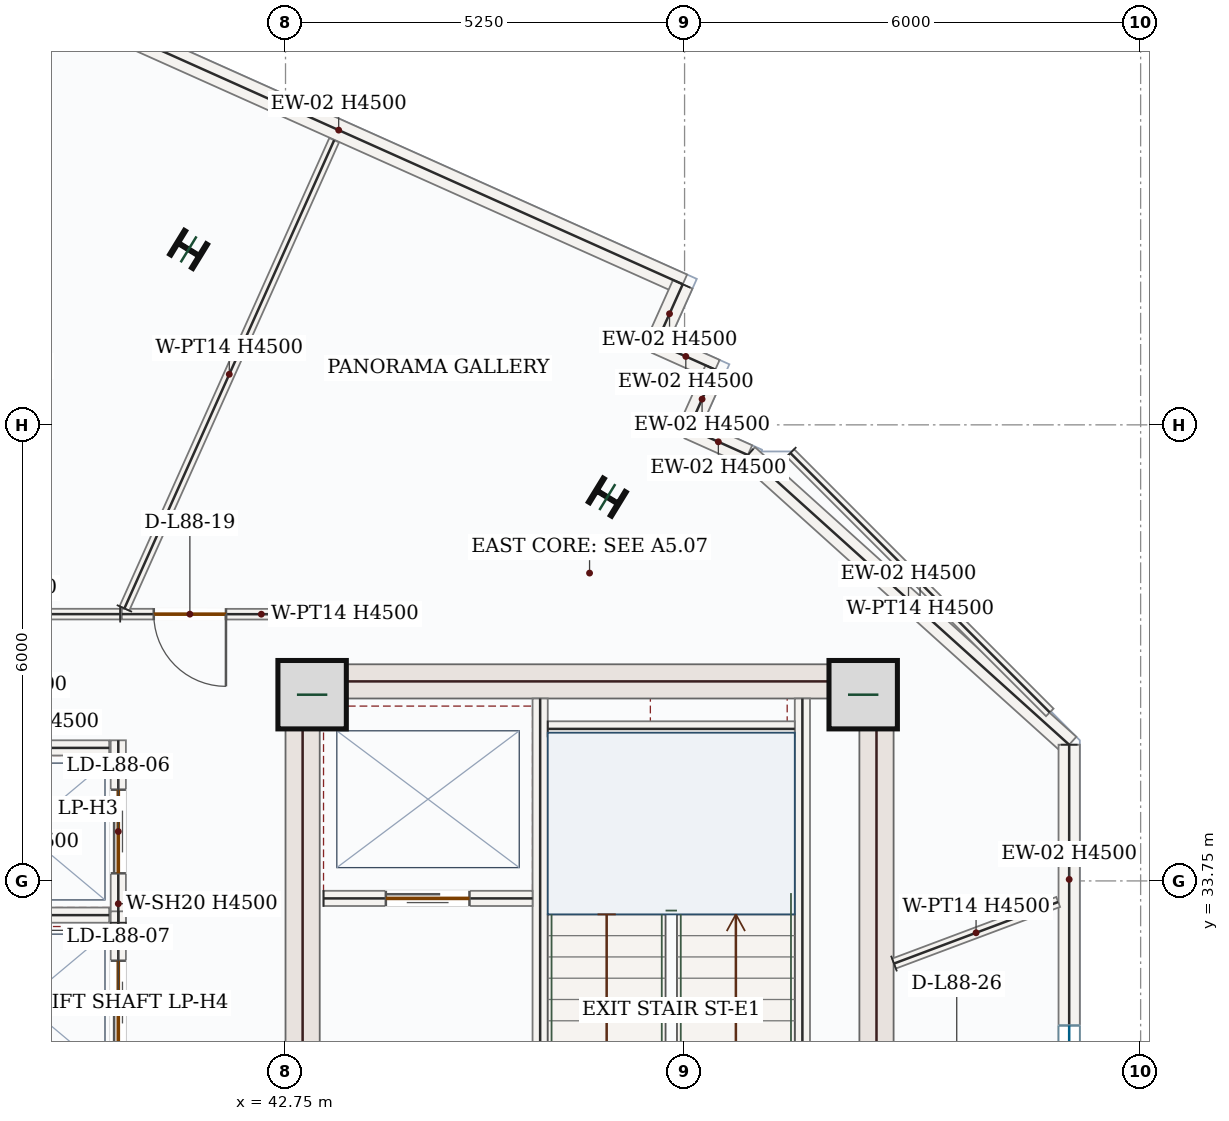
"""IFC4 building model, lengths in metres.
Left out: names, types, materials, properties, quantities, classifications, styles, units other than length and angle.
Written with IfcOpenShell. Run it as: python <this file> out.ifc"""

import sys

from ifc_helpers import new_model, si_unit, direction, frame, frame_2d, origin, origin_2d, place, context, subcontext, project, spatial, rectangle, i_section, extrude, source, transform, mapped, element, fill, save


model = new_model("IFC4")
c1 = context("Model", 3, precision=1e-05, world=origin(), true_north=direction((0.0, 1.0)))
c2 = subcontext(c1, "Body", "Model", "MODEL_VIEW")
j1 = project(units=[si_unit("LENGTHUNIT", "METRE"), si_unit("PLANEANGLEUNIT", "RADIAN")], contexts=[c1])
p1 = place(None, origin())
s1 = spatial("IfcSite", under=j1, at=p1, CompositionType="ELEMENT")
p2 = place(p1, origin())
s2 = spatial("IfcBuilding", under=s1, at=p2, CompositionType="ELEMENT")
p3 = place(p2, frame((0.0, 0.0, 361.05)))
s3 = spatial("IfcBuildingStorey", under=s2, at=p3, CompositionType="ELEMENT", Elevation=361.05)
p4 = place(p3, frame((42.975, 28.05, 0.0), z_axis=(0.0, 0.0, 1.0), x_axis=(0.0, 1.0, 0.0)))
e1 = element("IfcWall", 1, at=p4, inside=s3, PredefinedType="SHEAR", context=c2, shape_type="SweptSolid", body=[
    extrude(rectangle(XDim=8.55, YDim=0.45, at=frame_2d((4.275, 0.0))), origin(), (0.0, 0.0, 1.0), 4.5),
])
p5 = place(p4, frame((1.5, 0.0, 0.0)))
e2 = element("IfcOpeningElement", 2, at=p5, cuts=e1, PredefinedType="OPENING", context=c2, shape_type="SweptSolid", body=[
    extrude(rectangle(XDim=1.1, YDim=2.2, at=frame_2d((0.55, 1.1))), frame((0.0, 0.235, 0.0), z_axis=(0.0, -1.0, 0.0), x_axis=(1.0, 0.0, 0.0)), (0.0, 0.0, 1.0), 0.47),
])
m1 = source(origin(), c2, "Body", "SweptSolid", [
    extrude(rectangle(XDim=8.55, YDim=0.45, at=frame_2d((4.275, 0.0))), origin(), (0.0, 0.0, 1.0), 4.5),
])
p6 = place(p3, frame((50.525, 28.05, 0.0), z_axis=(0.0, 0.0, 1.0), x_axis=(0.0, 1.0, 0.0)))
e3 = element("IfcWall", 3, at=p6, inside=s3, PredefinedType="SHEAR", context=c2, shape_type="MappedRepresentation", body=[
    mapped(m1, transform((0.0, 0.0, 0.0), x_axis=(1.0, 0.0, 0.0), y_axis=(0.0, 1.0, 0.0), z_axis=(0.0, 0.0, 1.0), scale=1.0)),
])
m2 = source(origin(), c2, "Body", "SweptSolid", [
    extrude(rectangle(XDim=7.1, YDim=0.45, at=frame_2d((3.55, 0.0))), origin(), (0.0, 0.0, 1.0), 4.5),
])
p7 = place(p3, frame((43.2, 36.375, 0.0), z_axis=(0.0, 0.0, 1.0), x_axis=(1.0, 0.0, 0.0)))
e4 = element("IfcWall", 4, at=p7, inside=s3, PredefinedType="SHEAR", context=c2, shape_type="MappedRepresentation", body=[
    mapped(m2, transform((0.0, 0.0, 0.0), x_axis=(1.0, 0.0, 0.0), y_axis=(0.0, 1.0, 0.0), z_axis=(0.0, 0.0, 1.0), scale=1.0)),
])
m3 = source(origin(), c2, "Body", "SweptSolid", [
    extrude(rectangle(XDim=0.9, YDim=0.9, at=origin_2d()), origin(), (0.0, 0.0, 1.0), 4.8),
])
for number, where, z_axis, x_axis in (
    (5, (43.1, 36.2, 0.0), (0.0, 0.0, 1.0), (1.0, 0.0, 0.0)),
    (6, (50.35, 36.2, 0.0), (0.0, 0.0, 1.0), (1.0, 0.0, 0.0)),
):
    element("IfcColumn", number, at=place(p3, frame(where, z_axis=z_axis, x_axis=x_axis)), inside=s3, PredefinedType="COLUMN", context=c2, shape_type="MappedRepresentation", body=[
        mapped(m3, transform((0.0, 0.0, 0.0), x_axis=(1.0, 0.0, 0.0), y_axis=(0.0, 1.0, 0.0), z_axis=(0.0, 0.0, 1.0), scale=1.0)),
    ])
m4 = source(origin(), c2, "Body", "SweptSolid", [
    extrude(i_section(OverallWidth=0.369, OverallDepth=0.356, WebThickness=0.011, FlangeThickness=0.018, FilletRadius=0.018, at=origin_2d()), origin(), (0.0, 0.0, 1.0), 4.8),
])
for number, where, z_axis, x_axis in (
    (7, (46.984, 38.8, 0.0), (0.0, 0.0, 1.0), (0.522, 0.853, 0.0)),
    (8, (41.475, 42.058, 0.0), (0.0, 0.0, 1.0), (0.522, 0.853, 0.0)),
):
    element("IfcColumn", number, at=place(p3, frame(where, z_axis=z_axis, x_axis=x_axis)), inside=s3, PredefinedType="COLUMN", context=c2, shape_type="MappedRepresentation", body=[
        mapped(m4, transform((0.0, 0.0, 0.0), x_axis=(1.0, 0.0, 0.0), y_axis=(0.0, 1.0, 0.0), z_axis=(0.0, 0.0, 1.0), scale=1.0)),
    ])
m5 = source(origin(), c2, "Body", "SweptSolid", [
    extrude(rectangle(XDim=9.92, YDim=0.28, at=frame_2d((4.96, 0.0))), origin(), (0.0, 0.0, 1.0), 4.5),
])
p8 = place(p3, frame((38.923, 45.656, 0.0), z_axis=(0.0, 0.0, 1.0), x_axis=(0.91259673328, -0.408860859469, 0.0)))
e9 = element("IfcWall", 9, at=p8, inside=s3, PredefinedType="SOLIDWALL", context=c2, shape_type="MappedRepresentation", body=[
    mapped(m5, transform((0.0, 0.0, 0.0), x_axis=(1.0, 0.0, 0.0), y_axis=(0.0, 1.0, 0.0), z_axis=(0.0, 0.0, 1.0), scale=1.0)),
])
m6 = source(origin(), c2, "Body", "SweptSolid", [
    extrude(rectangle(XDim=0.85, YDim=0.28, at=frame_2d((0.425, 0.0))), origin(), (0.0, 0.0, 1.0), 4.5),
])
p9 = place(p3, frame((47.976, 41.6, 0.0), z_axis=(0.0, 0.0, 1.0), x_axis=(-0.408775447691, -0.912634994598, 0.0)))
e10 = element("IfcWall", 10, at=p9, inside=s3, PredefinedType="SOLIDWALL", context=c2, shape_type="MappedRepresentation", body=[
    mapped(m6, transform((0.0, 0.0, 0.0), x_axis=(1.0, 0.0, 0.0), y_axis=(0.0, 1.0, 0.0), z_axis=(0.0, 0.0, 1.0), scale=1.0)),
])
m7 = source(origin(), c2, "Body", "SweptSolid", [
    extrude(rectangle(XDim=0.85, YDim=0.28, at=frame_2d((0.425, 0.0))), origin(), (0.0, 0.0, 1.0), 4.5),
])
p10 = place(p3, frame((47.628, 40.824, 0.0), z_axis=(0.0, 0.0, 1.0), x_axis=(0.912527808644, -0.409014667771, 0.0)))
e11 = element("IfcWall", 11, at=p10, inside=s3, PredefinedType="SOLIDWALL", context=c2, shape_type="MappedRepresentation", body=[
    mapped(m7, transform((0.0, 0.0, 0.0), x_axis=(1.0, 0.0, 0.0), y_axis=(0.0, 1.0, 0.0), z_axis=(0.0, 0.0, 1.0), scale=1.0)),
])
p11 = place(p3, frame((48.404, 40.476, 0.0), z_axis=(0.0, 0.0, 1.0), x_axis=(-0.408775447691, -0.912634994598, 0.0)))
e12 = element("IfcWall", 12, at=p11, inside=s3, PredefinedType="SOLIDWALL", context=c2, shape_type="MappedRepresentation", body=[
    mapped(m6, transform((0.0, 0.0, 0.0), x_axis=(1.0, 0.0, 0.0), y_axis=(0.0, 1.0, 0.0), z_axis=(0.0, 0.0, 1.0), scale=1.0)),
])
p12 = place(p3, frame((48.057, 39.701, 0.0), z_axis=(0.0, 0.0, 1.0), x_axis=(0.912527808644, -0.409014667771, 0.0)))
e13 = element("IfcWall", 13, at=p12, inside=s3, PredefinedType="SOLIDWALL", context=c2, shape_type="MappedRepresentation", body=[
    mapped(m7, transform((0.0, 0.0, 0.0), x_axis=(1.0, 0.0, 0.0), y_axis=(0.0, 1.0, 0.0), z_axis=(0.0, 0.0, 1.0), scale=1.0)),
])
m8 = source(origin(), c2, "Body", "SweptSolid", [
    extrude(rectangle(XDim=5.692, YDim=0.28, at=frame_2d((2.846, 0.0))), origin(), (0.0, 0.0, 1.0), 4.5),
])
p13 = place(p3, frame((48.832, 39.353, 0.0), z_axis=(0.0, 0.0, 1.0), x_axis=(0.742767121681, -0.669549850981, 0.0)))
e14 = element("IfcWall", 14, at=p13, inside=s3, PredefinedType="SOLIDWALL", context=c2, shape_type="MappedRepresentation", body=[
    mapped(m8, transform((0.0, 0.0, 0.0), x_axis=(1.0, 0.0, 0.0), y_axis=(0.0, 1.0, 0.0), z_axis=(0.0, 0.0, 1.0), scale=1.0)),
])
p14 = place(p3, frame((53.06, 35.542, 0.0), z_axis=(0.0, 0.0, 1.0), x_axis=(0.0, -1.0, 0.0)))
e15 = element("IfcWall", 15, at=p14, inside=s3, PredefinedType="SOLIDWALL", context=c2, shape_type="SweptSolid", body=[
    extrude(rectangle(XDim=8.887, YDim=0.28, at=frame_2d((4.444, 0.0))), origin(), (0.0, 0.0, 1.0), 4.5),
])
p15 = place(p14, frame((3.694, 0.0, 0.85)))
e16 = element("IfcOpeningElement", 16, at=p15, cuts=e15, PredefinedType="OPENING", context=c2, shape_type="SweptSolid", body=[
    extrude(rectangle(XDim=1.5, YDim=1.5, at=frame_2d((0.75, 0.75))), frame((0.0, 0.15, 0.0), z_axis=(0.0, -1.0, 0.0), x_axis=(1.0, 0.0, 0.0)), (0.0, 0.0, 1.0), 0.3),
])
m9 = source(origin(), c2, "Body", "SweptSolid", [
    extrude(rectangle(XDim=7.87, YDim=0.2, at=frame_2d((3.935, 0.0))), origin(), (0.0, 0.0, 1.0), 4.5),
])
p16 = place(p3, frame((49.55, 28.28, 0.0), z_axis=(0.0, 0.0, 1.0), x_axis=(0.0, 1.0, 0.0)))
e17 = element("IfcWall", 17, at=p16, inside=s3, PredefinedType="SOLIDWALL", context=c2, shape_type="MappedRepresentation", body=[
    mapped(m9, transform((0.0, 0.0, 0.0), x_axis=(1.0, 0.0, 0.0), y_axis=(0.0, 1.0, 0.0), z_axis=(0.0, 0.0, 1.0), scale=1.0)),
])
p17 = place(p3, frame((46.1, 28.15, 0.0), z_axis=(0.0, 0.0, 1.0), x_axis=(0.0, 1.0, 0.0)))
e18 = element("IfcWall", 18, at=p17, inside=s3, PredefinedType="SOLIDWALL", context=c2, shape_type="SweptSolid", body=[
    extrude(rectangle(XDim=8.0, YDim=0.2, at=frame_2d((4.0, 0.0))), origin(), (0.0, 0.0, 1.0), 4.5),
])
p18 = place(p17, frame((0.4, 0.0, 0.0)))
e19 = element("IfcOpeningElement", 19, at=p18, cuts=e18, PredefinedType="OPENING", context=c2, shape_type="SweptSolid", body=[
    extrude(rectangle(XDim=1.05, YDim=2.15, at=frame_2d((0.525, 1.075))), frame((0.0, 0.11, 0.0), z_axis=(0.0, -1.0, 0.0), x_axis=(1.0, 0.0, 0.0)), (0.0, 0.0, 1.0), 0.22),
])
m10 = source(origin(), c2, "Body", "SweptSolid", [
    extrude(rectangle(XDim=3.25, YDim=0.2, at=frame_2d((1.625, 0.0))), origin(), (0.0, 0.0, 1.0), 4.5),
])
p19 = place(p3, frame((46.2, 35.75, 0.0), z_axis=(0.0, 0.0, 1.0), x_axis=(1.0, 0.0, 0.0)))
e20 = element("IfcWall", 20, at=p19, inside=s3, PredefinedType="SOLIDWALL", context=c2, shape_type="MappedRepresentation", body=[
    mapped(m10, transform((0.0, 0.0, 0.0), x_axis=(1.0, 0.0, 0.0), y_axis=(0.0, 1.0, 0.0), z_axis=(0.0, 0.0, 1.0), scale=1.0)),
])
p20 = place(p3, frame((43.25, 33.52, 0.0), z_axis=(0.0, 0.0, 1.0), x_axis=(1.0, 0.0, 0.0)))
e21 = element("IfcWall", 21, at=p20, inside=s3, PredefinedType="SOLIDWALL", context=c2, shape_type="SweptSolid", body=[
    extrude(rectangle(XDim=2.75, YDim=0.2, at=frame_2d((1.375, 0.0))), origin(), (0.0, 0.0, 1.0), 4.5),
])
p21 = place(p20, frame((0.82, 0.0, 0.0)))
e22 = element("IfcOpeningElement", 22, at=p21, cuts=e21, PredefinedType="OPENING", context=c2, shape_type="SweptSolid", body=[
    extrude(rectangle(XDim=1.1, YDim=2.15, at=frame_2d((0.55, 1.075))), frame((0.0, 0.11, 0.0), z_axis=(0.0, -1.0, 0.0), x_axis=(1.0, 0.0, 0.0)), (0.0, 0.0, 1.0), 0.22),
])
p22 = place(p3, frame((40.55, 33.2, 0.0), z_axis=(0.0, 0.0, 1.0), x_axis=(0.0, 1.0, 0.0)))
e23 = element("IfcWall", 23, at=p22, inside=s3, PredefinedType="SOLIDWALL", context=c2, shape_type="SweptSolid", body=[
    extrude(rectangle(XDim=2.4, YDim=0.2, at=frame_2d((1.2, 0.0))), origin(), (0.0, 0.0, 1.0), 4.5),
])
p23 = place(p22, frame((0.65, 0.0, 0.0)))
e24 = element("IfcOpeningElement", 24, at=p23, cuts=e23, PredefinedType="OPENING", context=c2, shape_type="SweptSolid", body=[
    extrude(rectangle(XDim=1.1, YDim=2.15, at=frame_2d((0.55, 1.075))), frame((0.0, 0.11, 0.0), z_axis=(0.0, -1.0, 0.0), x_axis=(1.0, 0.0, 0.0)), (0.0, 0.0, 1.0), 0.22),
])
m11 = source(origin(), c2, "Body", "SweptSolid", [
    extrude(rectangle(XDim=2.26, YDim=0.2, at=frame_2d((1.13, 0.0))), origin(), (0.0, 0.0, 1.0), 4.5),
])
for number, where, z_axis, x_axis in (
    (25, (38.17, 33.3, 0.0), (0.0, 0.0, 1.0), (1.0, 0.0, 0.0)),
    (26, (38.17, 35.5, 0.0), (0.0, 0.0, 1.0), (1.0, 0.0, 0.0)),
):
    element("IfcWall", number, at=place(p3, frame(where, z_axis=z_axis, x_axis=x_axis)), inside=s3, PredefinedType="SOLIDWALL", context=c2, shape_type="MappedRepresentation", body=[
        mapped(m11, transform((0.0, 0.0, 0.0), x_axis=(1.0, 0.0, 0.0), y_axis=(0.0, 1.0, 0.0), z_axis=(0.0, 0.0, 1.0), scale=1.0)),
    ])
p24 = place(p3, frame((40.55, 30.95, 0.0), z_axis=(0.0, 0.0, 1.0), x_axis=(0.0, 1.0, 0.0)))
e27 = element("IfcWall", 27, at=p24, inside=s3, PredefinedType="SOLIDWALL", context=c2, shape_type="SweptSolid", body=[
    extrude(rectangle(XDim=2.4, YDim=0.2, at=frame_2d((1.2, 0.0))), origin(), (0.0, 0.0, 1.0), 4.5),
])
p25 = place(p24, frame((0.65, 0.0, 0.0)))
e28 = element("IfcOpeningElement", 28, at=p25, cuts=e27, PredefinedType="OPENING", context=c2, shape_type="SweptSolid", body=[
    extrude(rectangle(XDim=1.1, YDim=2.15, at=frame_2d((0.55, 1.075))), frame((0.0, 0.11, 0.0), z_axis=(0.0, -1.0, 0.0), x_axis=(1.0, 0.0, 0.0)), (0.0, 0.0, 1.0), 0.22),
])
m12 = source(origin(), c2, "Body", "SweptSolid", [
    extrude(rectangle(XDim=2.307, YDim=0.14, at=frame_2d((1.154, 0.0))), origin(), (0.0, 0.0, 1.0), 4.5),
])
p26 = place(p3, frame((50.755, 32.663, 0.0), z_axis=(0.0, 0.0, 1.0), x_axis=(0.936329177569, 0.351123441588, 0.0)))
e29 = element("IfcWall", 29, at=p26, inside=s3, PredefinedType="PARTITIONING", context=c2, shape_type="MappedRepresentation", body=[
    mapped(m12, transform((0.0, 0.0, 0.0), x_axis=(1.0, 0.0, 0.0), y_axis=(0.0, 1.0, 0.0), z_axis=(0.0, 0.0, 1.0), scale=1.0)),
])
p27 = place(p3, frame((42.747, 37.259, 0.0), z_axis=(0.0, 0.0, 1.0), x_axis=(-0.999999838805, 0.000567794594, 0.0)))
e30 = element("IfcWall", 30, at=p27, inside=s3, PredefinedType="PARTITIONING", context=c2, shape_type="SweptSolid", body=[
    extrude(rectangle(XDim=2.15, YDim=0.14, at=frame_2d((1.075, 0.0))), origin(), (0.0, 0.0, 1.0), 4.5),
])
p28 = place(p27, frame((0.78, 0.0, 0.0)))
e31 = element("IfcOpeningElement", 31, at=p28, cuts=e30, PredefinedType="OPENING", context=c2, shape_type="SweptSolid", body=[
    extrude(rectangle(XDim=0.95, YDim=2.15, at=frame_2d((0.475, 1.075))), frame((0.0, 0.08, 0.0), z_axis=(0.0, -1.0, 0.0), x_axis=(1.0, 0.0, 0.0)), (0.0, 0.0, 1.0), 0.16),
])
m13 = source(origin(), c2, "Body", "SweptSolid", [
    extrude(rectangle(XDim=6.75, YDim=0.14, at=frame_2d((3.375, 0.0))), origin(), (0.0, 0.0, 1.0), 4.5),
])
p29 = place(p3, frame((40.63, 37.335, 0.0), z_axis=(0.0, 0.0, 1.0), x_axis=(0.408861688893, 0.912596361682, 0.0)))
e32 = element("IfcWall", 32, at=p29, inside=s3, PredefinedType="PARTITIONING", context=c2, shape_type="MappedRepresentation", body=[
    mapped(m13, transform((0.0, 0.0, 0.0), x_axis=(1.0, 0.0, 0.0), y_axis=(0.0, 1.0, 0.0), z_axis=(0.0, 0.0, 1.0), scale=1.0)),
])
m14 = source(origin(), c2, "Body", "SweptSolid", [
    extrude(rectangle(XDim=4.826, YDim=0.14, at=frame_2d((2.413, 0.0))), origin(), (0.0, 0.0, 1.0), 4.5),
])
p30 = place(p3, frame((49.392, 39.38, 0.0), z_axis=(0.0, 0.0, 1.0), x_axis=(0.707081488078, -0.70713207339, 0.0)))
e33 = element("IfcWall", 33, at=p30, inside=s3, PredefinedType="PARTITIONING", context=c2, shape_type="MappedRepresentation", body=[
    mapped(m14, transform((0.0, 0.0, 0.0), x_axis=(1.0, 0.0, 0.0), y_axis=(0.0, 1.0, 0.0), z_axis=(0.0, 0.0, 1.0), scale=1.0)),
])
p31 = place(p3, frame((40.575, 37.26, 0.0), z_axis=(0.0, 0.0, 1.0), x_axis=(-1.0, 0.0, 0.0)))
e34 = element("IfcWall", 34, at=p31, inside=s3, PredefinedType="PARTITIONING", context=c2, shape_type="SweptSolid", body=[
    extrude(rectangle(XDim=8.472, YDim=0.14, at=frame_2d((4.236, 0.0))), origin(), (0.0, 0.0, 1.0), 4.5),
])
p32 = place(p31, frame((3.761, 0.0, 0.0)))
e35 = element("IfcOpeningElement", 35, at=p32, cuts=e34, PredefinedType="OPENING", context=c2, shape_type="SweptSolid", body=[
    extrude(rectangle(XDim=0.95, YDim=2.15, at=frame_2d((0.475, 1.075))), frame((0.0, 0.08, 0.0), z_axis=(0.0, -1.0, 0.0), x_axis=(1.0, 0.0, 0.0)), (0.0, 0.0, 1.0), 0.16),
])
m15 = source(origin(), c2, "Body", "SweptSolid", [
    extrude(rectangle(XDim=1.5, YDim=1.5, at=frame_2d((0.75, 0.75))), frame((0.0, 0.03, 0.0), z_axis=(0.0, -1.0, 0.0), x_axis=(1.0, 0.0, 0.0)), (0.0, 0.0, 1.0), 0.06),
])
p33 = place(p15, origin())
e36 = element("IfcWindow", 36, at=p33, inside=s3, PartitioningType="SINGLE_PANEL", PredefinedType="WINDOW", context=c2, shape_type="MappedRepresentation", body=[
    mapped(m15, transform((0.0, 0.0, 0.0), x_axis=(1.0, 0.0, 0.0), y_axis=(0.0, 1.0, 0.0), z_axis=(0.0, 0.0, 1.0), scale=1.0)),
])
fill(e16, e36)
m16 = source(origin(), c2, "Body", "SweptSolid", [
    extrude(rectangle(XDim=1.1, YDim=2.15, at=frame_2d((0.55, 1.075))), frame((0.0, 0.025, 0.0), z_axis=(0.0, -1.0, 0.0), x_axis=(1.0, 0.0, 0.0)), (0.0, 0.0, 1.0), 0.05),
])
p34 = place(p21, origin())
e37 = element("IfcDoor", 37, at=p34, inside=s3, OperationType="DOUBLE_DOOR_SLIDING", PredefinedType="DOOR", context=c2, shape_type="MappedRepresentation", body=[
    mapped(m16, transform((0.0, 0.0, 0.0), x_axis=(1.0, 0.0, 0.0), y_axis=(0.0, 1.0, 0.0), z_axis=(0.0, 0.0, 1.0), scale=1.0)),
])
fill(e22, e37)
p35 = place(p23, origin())
e38 = element("IfcDoor", 38, at=p35, inside=s3, OperationType="DOUBLE_DOOR_SLIDING", PredefinedType="DOOR", context=c2, shape_type="MappedRepresentation", body=[
    mapped(m16, transform((0.0, 0.0, 0.0), x_axis=(1.0, 0.0, 0.0), y_axis=(0.0, 1.0, 0.0), z_axis=(0.0, 0.0, 1.0), scale=1.0)),
])
fill(e24, e38)
p36 = place(p25, origin())
e39 = element("IfcDoor", 39, at=p36, inside=s3, OperationType="DOUBLE_DOOR_SLIDING", PredefinedType="DOOR", context=c2, shape_type="MappedRepresentation", body=[
    mapped(m16, transform((0.0, 0.0, 0.0), x_axis=(1.0, 0.0, 0.0), y_axis=(0.0, 1.0, 0.0), z_axis=(0.0, 0.0, 1.0), scale=1.0)),
])
fill(e28, e39)
m17 = source(origin(), c2, "Body", "SweptSolid", [
    extrude(rectangle(XDim=0.95, YDim=2.15, at=frame_2d((0.475, 1.075))), frame((0.0, 0.025, 0.0), z_axis=(0.0, -1.0, 0.0), x_axis=(1.0, 0.0, 0.0)), (0.0, 0.0, 1.0), 0.05),
])
p37 = place(p28, origin())
e40 = element("IfcDoor", 40, at=p37, inside=s3, OperationType="SINGLE_SWING_LEFT", PredefinedType="DOOR", context=c2, shape_type="MappedRepresentation", body=[
    mapped(m17, transform((0.0, 0.0, 0.0), x_axis=(1.0, 0.0, 0.0), y_axis=(0.0, 1.0, 0.0), z_axis=(0.0, 0.0, 1.0), scale=1.0)),
])
fill(e31, e40)
save(model, sys.argv[1])
